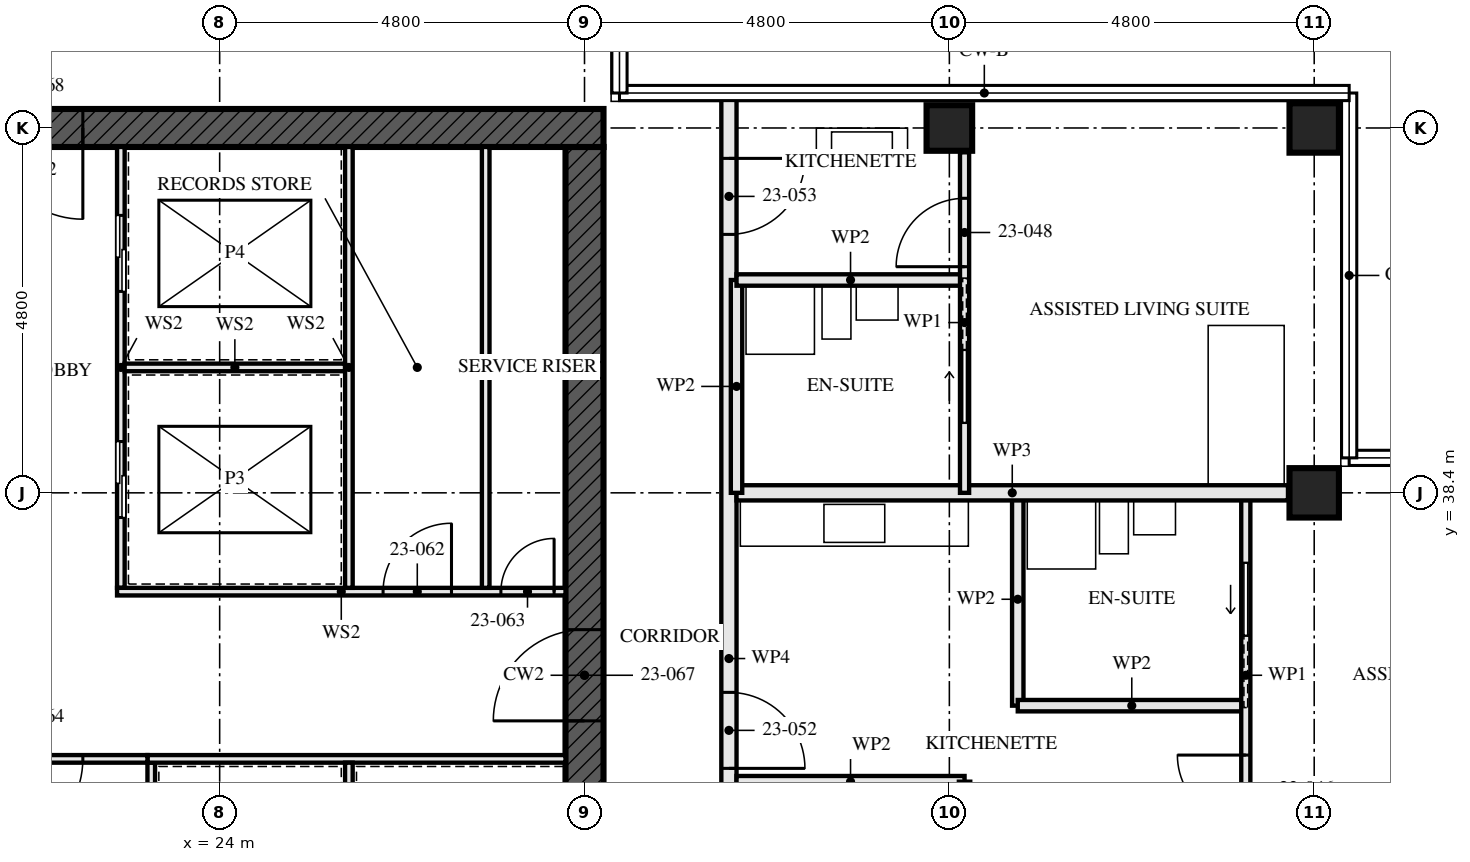
"""IFC4 building model, lengths in metres.
Left out: names, types, materials, properties, quantities, classifications, styles, units other than length and angle.
Written with IfcOpenShell. Run it as: python <this file> out.ifc"""

import sys

from ifc_helpers import new_model, si_unit, direction, frame, frame_2d, origin, origin_2d, place, context, subcontext, project, spatial, rectangle, hollow_rectangle, extrude, element, fill, save


model = new_model("IFC4")
c1 = context("Model", 3, precision=1e-05, world=origin(), true_north=direction((0.0, 1.0)))
c2 = subcontext(c1, "Body", "Model", "MODEL_VIEW")
j1 = project(units=[si_unit("LENGTHUNIT", "METRE"), si_unit("PLANEANGLEUNIT", "RADIAN")], contexts=[c1])
p1 = place(None, origin())
s1 = spatial("IfcSite", under=j1, at=p1, CompositionType="ELEMENT")
p2 = place(p1, origin())
s2 = spatial("IfcBuilding", under=s1, at=p2, CompositionType="ELEMENT")
p3 = place(p2, frame((0.0, 0.0, 87.5)))
s3 = spatial("IfcBuildingStorey", under=s2, at=p3, CompositionType="ELEMENT", Elevation=87.5)
p4 = place(p3, frame((33.6, 43.2, 0.0), z_axis=(0.0, 0.0, 1.0), x_axis=(0.0, 1.0, 0.0)))
e1 = element("IfcColumn", 1, at=p4, inside=s3, PredefinedType="COLUMN", context=c2, shape_type="SweptSolid", body=[
    extrude(hollow_rectangle(XDim=0.6, YDim=0.6, WallThickness=0.08, at=origin_2d()), origin(), (0.0, 0.0, 1.0), 3.5),
])
for number, where, z_axis, x_axis in (
    (2, (38.4, 38.4, 0.0), (0.0, 0.0, 1.0), (0.0, 1.0, 0.0)),
    (3, (38.4, 43.2, 0.0), (0.0, 0.0, 1.0), (0.0, 1.0, 0.0)),
):
    element("IfcColumn", number, at=place(p3, frame(where, z_axis=z_axis, x_axis=x_axis)), inside=s3, PredefinedType="COLUMN", context=c2, shape_type="SweptSolid", body=[
        extrude(hollow_rectangle(XDim=0.65, YDim=0.65, WallThickness=0.08, at=origin_2d()), origin(), (0.0, 0.0, 1.0), 3.5),
    ])
p5 = place(p3, frame((29.05, 43.2, -0.17), z_axis=(0.0, 0.0, 1.0), x_axis=(-1.0, 0.0, 0.0)))
e4 = element("IfcWall", 4, at=p5, inside=s3, PredefinedType="SHEAR", context=c2, shape_type="SweptSolid", body=[
    extrude(rectangle(XDim=14.9, YDim=0.5, at=frame_2d((7.45, 0.0))), origin(), (0.0, 0.0, 1.0), 3.5),
])
p6 = place(p5, frame((6.85, 0.0, 0.17)))
e5 = element("IfcOpeningElement", 5, at=p6, cuts=e4, PredefinedType="OPENING", context=c2, shape_type="SweptSolid", body=[
    extrude(rectangle(XDim=1.2, YDim=2.1, at=frame_2d((0.6, 1.05))), frame((0.0, 0.26, 0.0), z_axis=(0.0, -1.0, 0.0), x_axis=(1.0, 0.0, 0.0)), (0.0, 0.0, 1.0), 0.521),
])
p7 = place(p3, frame((28.8, 29.05, -0.17), z_axis=(0.0, 0.0, 1.0), x_axis=(0.0, 1.0, 0.0)))
e6 = element("IfcWall", 6, at=p7, inside=s3, PredefinedType="SHEAR", context=c2, shape_type="SweptSolid", body=[
    extrude(rectangle(XDim=13.9, YDim=0.5, at=frame_2d((6.95, 0.0))), origin(), (0.0, 0.0, 1.0), 3.5),
])
p8 = place(p7, frame((6.35, 0.0, 0.17)))
e7 = element("IfcOpeningElement", 7, at=p8, cuts=e6, PredefinedType="OPENING", context=c2, shape_type="SweptSolid", body=[
    extrude(rectangle(XDim=1.2, YDim=2.1, at=frame_2d((0.6, 1.05))), frame((0.0, 0.26, 0.0), z_axis=(0.0, -1.0, 0.0), x_axis=(1.0, 0.0, 0.0)), (0.0, 0.0, 1.0), 0.521),
])
p9 = place(p3, frame((33.8, 32.2, 0.0), z_axis=(0.0, 0.0, 1.0), x_axis=(0.0, 1.0, 0.0)))
e8 = element("IfcWall", 8, at=p9, inside=s3, PredefinedType="PARTITIONING", context=c2, shape_type="SweptSolid", body=[
    extrude(rectangle(XDim=2.4, YDim=0.15, at=frame_2d((1.2, 0.0))), origin(), (0.0, 0.0, 1.0), 2.55),
])
for number, where, z_axis, x_axis in (
    (9, (33.8, 34.6, 0.0), (0.0, 0.0, 1.0), (-1.0, 0.0, 0.0)),
    (10, (37.5, 35.6, 0.0), (0.0, 0.0, 1.0), (-1.0, 0.0, 0.0)),
):
    element("IfcWall", number, at=place(p3, frame(where, z_axis=z_axis, x_axis=x_axis)), inside=s3, PredefinedType="PARTITIONING", context=c2, shape_type="SweptSolid", body=[
        extrude(rectangle(XDim=3.0, YDim=0.15, at=frame_2d((1.5, 0.0))), origin(), (0.0, 0.0, 1.0), 3.33),
    ])
p10 = place(p3, frame((34.5, 35.6, 0.0), z_axis=(0.0, 0.0, 1.0), x_axis=(0.0, 1.0, 0.0)))
e11 = element("IfcWall", 11, at=p10, inside=s3, PredefinedType="PARTITIONING", context=c2, shape_type="SweptSolid", body=[
    extrude(rectangle(XDim=2.8, YDim=0.15, at=frame_2d((1.4, 0.0))), origin(), (0.0, 0.0, 1.0), 3.33),
])
p11 = place(p3, frame((37.5, 33.6, 0.0), z_axis=(0.0, 0.0, 1.0), x_axis=(0.0, 1.0, 0.0)))
e12 = element("IfcWall", 12, at=p11, inside=s3, PredefinedType="PARTITIONING", context=c2, shape_type="SweptSolid", body=[
    extrude(rectangle(XDim=4.8, YDim=0.12, at=frame_2d((2.4, 0.0))), origin(), (0.0, 0.0, 1.0), 3.33),
])
p12 = place(p11, frame((0.45, 0.0, 0.0)))
e13 = element("IfcOpeningElement", 13, at=p12, cuts=e12, PredefinedType="OPENING", context=c2, shape_type="SweptSolid", body=[
    extrude(rectangle(XDim=0.9, YDim=2.1, at=frame_2d((0.45, 1.05))), frame((0.0, 0.071, 0.0), z_axis=(0.0, -1.0, 0.0), x_axis=(1.0, 0.0, 0.0)), (0.0, 0.0, 1.0), 0.141),
])
p13 = place(p11, frame((2.925, 0.0, 0.0)))
e14 = element("IfcOpeningElement", 14, at=p13, cuts=e12, PredefinedType="OPENING", context=c2, shape_type="SweptSolid", body=[
    extrude(rectangle(XDim=0.95, YDim=2.1, at=frame_2d((0.475, 1.05))), frame((0.0, 0.071, 0.0), z_axis=(0.0, -1.0, 0.0), x_axis=(1.0, 0.0, 0.0)), (0.0, 0.0, 1.0), 0.141),
])
p14 = place(p3, frame((38.055, 38.4, 0.0), z_axis=(0.0, 0.0, 1.0), x_axis=(-1.0, 0.0, 0.0)))
e15 = element("IfcWall", 15, at=p14, inside=s3, PredefinedType="PARTITIONING", context=c2, shape_type="SweptSolid", body=[
    extrude(rectangle(XDim=7.255, YDim=0.2, at=frame_2d((3.627, 0.0))), origin(), (0.0, 0.0, 1.0), 2.55),
])
p15 = place(p3, frame((33.8, 41.2, 0.0), z_axis=(0.0, 0.0, 1.0), x_axis=(-1.0, 0.0, 0.0)))
e16 = element("IfcWall", 16, at=p15, inside=s3, PredefinedType="PARTITIONING", context=c2, shape_type="SweptSolid", body=[
    extrude(rectangle(XDim=3.0, YDim=0.15, at=frame_2d((1.5, 0.0))), origin(), (0.0, 0.0, 1.0), 3.33),
])
p16 = place(p3, frame((30.8, 38.4, 0.0), z_axis=(0.0, 0.0, 1.0), x_axis=(0.0, 1.0, 0.0)))
e17 = element("IfcWall", 17, at=p16, inside=s3, PredefinedType="PARTITIONING", context=c2, shape_type="SweptSolid", body=[
    extrude(rectangle(XDim=2.8, YDim=0.15, at=frame_2d((1.4, 0.0))), origin(), (0.0, 0.0, 1.0), 3.33),
])
p17 = place(p3, frame((33.8, 38.4, 0.0), z_axis=(0.0, 0.0, 1.0), x_axis=(0.0, 1.0, 0.0)))
e18 = element("IfcWall", 18, at=p17, inside=s3, PredefinedType="PARTITIONING", context=c2, shape_type="SweptSolid", body=[
    extrude(rectangle(XDim=4.48, YDim=0.12, at=frame_2d((2.24, 0.0))), origin(), (0.0, 0.0, 1.0), 3.33),
])
p18 = place(p17, frame((2.975, 0.0, 0.0)))
e19 = element("IfcOpeningElement", 19, at=p18, cuts=e18, PredefinedType="OPENING", context=c2, shape_type="SweptSolid", body=[
    extrude(rectangle(XDim=0.9, YDim=2.1, at=frame_2d((0.45, 1.05))), frame((0.0, 0.071, 0.0), z_axis=(0.0, -1.0, 0.0), x_axis=(1.0, 0.0, 0.0)), (0.0, 0.0, 1.0), 0.141),
])
p19 = place(p17, frame((0.925, 0.0, 0.0)))
e20 = element("IfcOpeningElement", 20, at=p19, cuts=e18, PredefinedType="OPENING", context=c2, shape_type="SweptSolid", body=[
    extrude(rectangle(XDim=0.95, YDim=2.1, at=frame_2d((0.475, 1.05))), frame((0.0, 0.071, 0.0), z_axis=(0.0, -1.0, 0.0), x_axis=(1.0, 0.0, 0.0)), (0.0, 0.0, 1.0), 0.141),
])
p20 = place(p3, frame((30.7, 28.8, 0.0), z_axis=(0.0, 0.0, 1.0), x_axis=(0.0, 1.0, 0.0)))
e21 = element("IfcWall", 21, at=p20, inside=s3, PredefinedType="PARTITIONING", context=c2, shape_type="SweptSolid", body=[
    extrude(rectangle(XDim=14.84, YDim=0.2, at=frame_2d((7.42, 0.0))), origin(), (0.0, 0.0, 1.0), 2.32),
])
p21 = place(p20, frame((1.4, 0.0, 0.0)))
e22 = element("IfcOpeningElement", 22, at=p21, cuts=e21, PredefinedType="OPENING", context=c2, shape_type="SweptSolid", body=[
    extrude(rectangle(XDim=1.0, YDim=2.1, at=frame_2d((0.5, 1.05))), frame((0.0, 0.111, 0.0), z_axis=(0.0, -1.0, 0.0), x_axis=(1.0, 0.0, 0.0)), (0.0, 0.0, 1.0), 0.221),
])
p22 = place(p20, frame((4.1, 0.0, 0.0)))
e23 = element("IfcOpeningElement", 23, at=p22, cuts=e21, PredefinedType="OPENING", context=c2, shape_type="SweptSolid", body=[
    extrude(rectangle(XDim=1.0, YDim=2.1, at=frame_2d((0.5, 1.05))), frame((0.0, 0.111, 0.0), z_axis=(0.0, -1.0, 0.0), x_axis=(1.0, 0.0, 0.0)), (0.0, 0.0, 1.0), 0.221),
])
p23 = place(p20, frame((5.975, 0.0, 0.0)))
e24 = element("IfcOpeningElement", 24, at=p23, cuts=e21, PredefinedType="OPENING", context=c2, shape_type="SweptSolid", body=[
    extrude(rectangle(XDim=1.0, YDim=2.1, at=frame_2d((0.5, 1.05))), frame((0.0, 0.111, 0.0), z_axis=(0.0, -1.0, 0.0), x_axis=(1.0, 0.0, 0.0)), (0.0, 0.0, 1.0), 0.221),
])
p24 = place(p20, frame((13.0, 0.0, 0.0)))
e25 = element("IfcOpeningElement", 25, at=p24, cuts=e21, PredefinedType="OPENING", context=c2, shape_type="SweptSolid", body=[
    extrude(rectangle(XDim=1.0, YDim=2.1, at=frame_2d((0.5, 1.05))), frame((0.0, 0.111, 0.0), z_axis=(0.0, -1.0, 0.0), x_axis=(1.0, 0.0, 0.0)), (0.0, 0.0, 1.0), 0.221),
])
p25 = place(p3, frame((27.5, 37.15, 0.0), z_axis=(0.0, 0.0, 1.0), x_axis=(0.0, 1.0, 0.0)))
e26 = element("IfcWall", 26, at=p25, inside=s3, PredefinedType="SOLIDWALL", context=c2, shape_type="SweptSolid", body=[
    extrude(rectangle(XDim=5.8, YDim=0.1, at=frame_2d((2.9, 0.0))), origin(), (0.0, 0.0, 1.0), 3.33),
])
p26 = place(p3, frame((22.7, 37.15, 0.0), z_axis=(0.0, 0.0, 1.0), x_axis=(0.0, 1.0, 0.0)))
e27 = element("IfcWall", 27, at=p26, inside=s3, PredefinedType="SOLIDWALL", context=c2, shape_type="SweptSolid", body=[
    extrude(rectangle(XDim=5.8, YDim=0.1, at=frame_2d((2.9, 0.0))), origin(), (0.0, 0.0, 1.0), 3.33),
])
p27 = place(p26, frame((0.925, 0.0, 0.0)))
e28 = element("IfcOpeningElement", 28, at=p27, cuts=e27, PredefinedType="OPENING", context=c2, shape_type="SweptSolid", body=[
    extrude(rectangle(XDim=1.0, YDim=2.1, at=frame_2d((0.5, 1.05))), frame((0.0, 0.061, 0.0), z_axis=(0.0, -1.0, 0.0), x_axis=(1.0, 0.0, 0.0)), (0.0, 0.0, 1.0), 0.121),
])
p28 = place(p26, frame((3.9, 0.0, 0.0)))
e29 = element("IfcOpeningElement", 29, at=p28, cuts=e27, PredefinedType="OPENING", context=c2, shape_type="SweptSolid", body=[
    extrude(rectangle(XDim=1.0, YDim=2.1, at=frame_2d((0.5, 1.05))), frame((0.0, 0.061, 0.0), z_axis=(0.0, -1.0, 0.0), x_axis=(1.0, 0.0, 0.0)), (0.0, 0.0, 1.0), 0.121),
])
p29 = place(p3, frame((23.1, 29.05, 0.0), z_axis=(0.0, 0.0, 1.0), x_axis=(0.0, 1.0, 0.0)))
e30 = element("IfcWall", 30, at=p29, inside=s3, PredefinedType="SOLIDWALL", context=c2, shape_type="SweptSolid", body=[
    extrude(rectangle(XDim=5.8, YDim=0.1, at=frame_2d((2.9, 0.0))), origin(), (0.0, 0.0, 1.0), 3.33),
])
p30 = place(p29, frame((1.0, 0.0, 0.0)))
e31 = element("IfcOpeningElement", 31, at=p30, cuts=e30, PredefinedType="OPENING", context=c2, shape_type="SweptSolid", body=[
    extrude(rectangle(XDim=0.7, YDim=2.1, at=frame_2d((0.35, 1.05))), frame((0.0, 0.061, 0.0), z_axis=(0.0, -1.0, 0.0), x_axis=(1.0, 0.0, 0.0)), (0.0, 0.0, 1.0), 0.121),
])
p31 = place(p3, frame((23.05, 34.9, 0.0), z_axis=(0.0, 0.0, 1.0), x_axis=(1.0, 0.0, 0.0)))
e32 = element("IfcWall", 32, at=p31, inside=s3, PredefinedType="SOLIDWALL", context=c2, shape_type="SweptSolid", body=[
    extrude(rectangle(XDim=5.5, YDim=0.1, at=frame_2d((2.75, 0.0))), origin(), (0.0, 0.0, 1.0), 3.33),
])
p32 = place(p3, frame((22.65, 37.1, 0.0), z_axis=(0.0, 0.0, 1.0), x_axis=(1.0, 0.0, 0.0)))
e33 = element("IfcWall", 33, at=p32, inside=s3, PredefinedType="SOLIDWALL", context=c2, shape_type="SweptSolid", body=[
    extrude(rectangle(XDim=5.9, YDim=0.1, at=frame_2d((2.95, 0.0))), origin(), (0.0, 0.0, 1.0), 3.33),
])
p33 = place(p32, frame((3.5, 0.0, 0.0)))
e34 = element("IfcOpeningElement", 34, at=p33, cuts=e33, PredefinedType="OPENING", context=c2, shape_type="SweptSolid", body=[
    extrude(rectangle(XDim=0.9, YDim=2.1, at=frame_2d((0.45, 1.05))), frame((0.0, 0.061, 0.0), z_axis=(0.0, -1.0, 0.0), x_axis=(1.0, 0.0, 0.0)), (0.0, 0.0, 1.0), 0.121),
])
p34 = place(p32, frame((5.05, 0.0, 0.0)))
e35 = element("IfcOpeningElement", 35, at=p34, cuts=e33, PredefinedType="OPENING", context=c2, shape_type="SweptSolid", body=[
    extrude(rectangle(XDim=0.7, YDim=2.1, at=frame_2d((0.35, 1.05))), frame((0.0, 0.061, 0.0), z_axis=(0.0, -1.0, 0.0), x_axis=(1.0, 0.0, 0.0)), (0.0, 0.0, 1.0), 0.121),
])
p35 = place(p3, frame((20.55, 34.9, 0.0), z_axis=(0.0, 0.0, 1.0), x_axis=(1.0, 0.0, 0.0)))
e36 = element("IfcWall", 36, at=p35, inside=s3, PredefinedType="SOLIDWALL", context=c2, shape_type="SweptSolid", body=[
    extrude(rectangle(XDim=2.5, YDim=0.1, at=frame_2d((1.25, 0.0))), origin(), (0.0, 0.0, 1.0), 3.33),
])
p36 = place(p35, frame((0.45, 0.0, 0.0)))
e37 = element("IfcOpeningElement", 37, at=p36, cuts=e36, PredefinedType="OPENING", context=c2, shape_type="SweptSolid", body=[
    extrude(rectangle(XDim=1.2, YDim=2.1, at=frame_2d((0.6, 1.05))), frame((0.0, 0.061, 0.0), z_axis=(0.0, -1.0, 0.0), x_axis=(1.0, 0.0, 0.0)), (0.0, 0.0, 1.0), 0.121),
])
p37 = place(p3, frame((22.75, 40.05, 0.0), z_axis=(0.0, 0.0, 1.0), x_axis=(1.0, 0.0, 0.0)))
e38 = element("IfcWall", 38, at=p37, inside=s3, PredefinedType="SOLIDWALL", context=c2, shape_type="SweptSolid", body=[
    extrude(rectangle(XDim=2.9, YDim=0.1, at=frame_2d((1.45, 0.0))), origin(), (0.0, 0.0, 1.0), 3.33),
])
p38 = place(p3, frame((25.7, 37.15, 0.0), z_axis=(0.0, 0.0, 1.0), x_axis=(0.0, 1.0, 0.0)))
e39 = element("IfcWall", 39, at=p38, inside=s3, PredefinedType="SOLIDWALL", context=c2, shape_type="SweptSolid", body=[
    extrude(rectangle(XDim=5.8, YDim=0.1, at=frame_2d((2.9, 0.0))), origin(), (0.0, 0.0, 1.0), 3.33),
])
p39 = place(p3, frame((25.7, 31.95, 0.0), z_axis=(0.0, 0.0, 1.0), x_axis=(0.0, 1.0, 0.0)))
e40 = element("IfcWall", 40, at=p39, inside=s3, PredefinedType="SOLIDWALL", context=c2, shape_type="SweptSolid", body=[
    extrude(rectangle(XDim=2.9, YDim=0.1, at=frame_2d((1.45, 0.0))), origin(), (0.0, 0.0, 1.0), 3.33),
])
p40 = place(p12, origin())
e41 = element("IfcDoor", 41, at=p40, inside=s3, OperationType="SINGLE_SWING_LEFT", PredefinedType="DOOR", context=c2, shape_type="SweptSolid", body=[
    extrude(rectangle(XDim=0.9, YDim=2.1, at=frame_2d((0.45, 1.05))), frame((0.0, 0.022, 0.0), z_axis=(0.0, -1.0, 0.0), x_axis=(1.0, 0.0, 0.0)), (0.0, 0.0, 1.0), 0.044),
])
fill(e13, e41)
p41 = place(p13, origin())
e42 = element("IfcDoor", 42, at=p41, inside=s3, OperationType="SLIDING_TO_RIGHT", PredefinedType="DOOR", context=c2, shape_type="SweptSolid", body=[
    extrude(rectangle(XDim=0.95, YDim=2.1, at=frame_2d((0.475, 1.05))), frame((0.0, 0.022, 0.0), z_axis=(0.0, -1.0, 0.0), x_axis=(1.0, 0.0, 0.0)), (0.0, 0.0, 1.0), 0.044),
])
fill(e14, e42)
p42 = place(p18, origin())
e43 = element("IfcDoor", 43, at=p42, inside=s3, OperationType="SINGLE_SWING_RIGHT", PredefinedType="DOOR", context=c2, shape_type="SweptSolid", body=[
    extrude(rectangle(XDim=0.9, YDim=2.1, at=frame_2d((0.45, 1.05))), frame((0.0, 0.022, 0.0), z_axis=(0.0, -1.0, 0.0), x_axis=(1.0, 0.0, 0.0)), (0.0, 0.0, 1.0), 0.044),
])
fill(e19, e43)
p43 = place(p19, origin())
e44 = element("IfcDoor", 44, at=p43, inside=s3, OperationType="SLIDING_TO_LEFT", PredefinedType="DOOR", context=c2, shape_type="SweptSolid", body=[
    extrude(rectangle(XDim=0.95, YDim=2.1, at=frame_2d((0.475, 1.05))), frame((0.0, 0.022, 0.0), z_axis=(0.0, -1.0, 0.0), x_axis=(1.0, 0.0, 0.0)), (0.0, 0.0, 1.0), 0.044),
])
fill(e20, e44)
p44 = place(p23, frame((1.0, 0.0, 0.0), z_axis=(0.0, 0.0, 1.0), x_axis=(-1.0, 0.0, 0.0)))
e45 = element("IfcDoor", 45, at=p44, inside=s3, OperationType="SINGLE_SWING_LEFT", PredefinedType="DOOR", context=c2, shape_type="SweptSolid", body=[
    extrude(rectangle(XDim=1.0, YDim=2.1, at=frame_2d((0.5, 1.05))), frame((0.0, 0.027, 0.0), z_axis=(0.0, -1.0, 0.0), x_axis=(1.0, 0.0, 0.0)), (0.0, 0.0, 1.0), 0.054),
])
fill(e24, e45)
p45 = place(p24, frame((1.0, 0.0, 0.0), z_axis=(0.0, 0.0, 1.0), x_axis=(-1.0, 0.0, 0.0)))
e46 = element("IfcDoor", 46, at=p45, inside=s3, OperationType="SINGLE_SWING_RIGHT", PredefinedType="DOOR", context=c2, shape_type="SweptSolid", body=[
    extrude(rectangle(XDim=1.0, YDim=2.1, at=frame_2d((0.5, 1.05))), frame((0.0, 0.027, 0.0), z_axis=(0.0, -1.0, 0.0), x_axis=(1.0, 0.0, 0.0)), (0.0, 0.0, 1.0), 0.054),
])
fill(e25, e46)
p46 = place(p27, origin())
e47 = element("IfcDoor", 47, at=p46, inside=s3, OperationType="SLIDING_TO_LEFT", PredefinedType="DOOR", context=c2, shape_type="SweptSolid", body=[
    extrude(rectangle(XDim=1.0, YDim=2.1, at=frame_2d((0.5, 1.05))), frame((0.0, 0.05, 0.0), z_axis=(0.0, -1.0, 0.0), x_axis=(1.0, 0.0, 0.0)), (0.0, 0.0, 1.0), 0.1),
])
fill(e28, e47)
p47 = place(p28, origin())
e48 = element("IfcDoor", 48, at=p47, inside=s3, OperationType="SLIDING_TO_LEFT", PredefinedType="DOOR", context=c2, shape_type="SweptSolid", body=[
    extrude(rectangle(XDim=1.0, YDim=2.1, at=frame_2d((0.5, 1.05))), frame((0.0, 0.05, 0.0), z_axis=(0.0, -1.0, 0.0), x_axis=(1.0, 0.0, 0.0)), (0.0, 0.0, 1.0), 0.1),
])
fill(e29, e48)
p48 = place(p33, origin())
e49 = element("IfcDoor", 49, at=p48, inside=s3, OperationType="SINGLE_SWING_LEFT", PredefinedType="DOOR", context=c2, shape_type="SweptSolid", body=[
    extrude(rectangle(XDim=0.9, YDim=2.1, at=frame_2d((0.45, 1.05))), frame((0.0, 0.027, 0.0), z_axis=(0.0, -1.0, 0.0), x_axis=(1.0, 0.0, 0.0)), (0.0, 0.0, 1.0), 0.054),
])
fill(e34, e49)
p49 = place(p34, origin())
e50 = element("IfcDoor", 50, at=p49, inside=s3, OperationType="SINGLE_SWING_LEFT", PredefinedType="DOOR", context=c2, shape_type="SweptSolid", body=[
    extrude(rectangle(XDim=0.7, YDim=2.1, at=frame_2d((0.35, 1.05))), frame((0.0, 0.027, 0.0), z_axis=(0.0, -1.0, 0.0), x_axis=(1.0, 0.0, 0.0)), (0.0, 0.0, 1.0), 0.054),
])
fill(e35, e50)
p50 = place(p36, frame((1.2, 0.0, 0.0), z_axis=(0.0, 0.0, 1.0), x_axis=(-1.0, 0.0, 0.0)))
e51 = element("IfcDoor", 51, at=p50, inside=s3, OperationType="SINGLE_SWING_LEFT", PredefinedType="DOOR", context=c2, shape_type="SweptSolid", body=[
    extrude(rectangle(XDim=1.2, YDim=2.1, at=frame_2d((0.6, 1.05))), frame((0.0, 0.027, 0.0), z_axis=(0.0, -1.0, 0.0), x_axis=(1.0, 0.0, 0.0)), (0.0, 0.0, 1.0), 0.054),
])
fill(e37, e51)
p51 = place(p8, origin())
e52 = element("IfcDoor", 52, at=p51, inside=s3, OperationType="SINGLE_SWING_LEFT", PredefinedType="DOOR", context=c2, shape_type="SweptSolid", body=[
    extrude(rectangle(XDim=1.2, YDim=2.1, at=frame_2d((0.6, 1.05))), frame((0.0, 0.027, 0.0), z_axis=(0.0, -1.0, 0.0), x_axis=(1.0, 0.0, 0.0)), (0.0, 0.0, 1.0), 0.054),
])
fill(e7, e52)
p52 = place(p6, origin())
e53 = element("IfcDoor", 53, at=p52, inside=s3, OperationType="SINGLE_SWING_LEFT", PredefinedType="DOOR", context=c2, shape_type="SweptSolid", body=[
    extrude(rectangle(XDim=1.2, YDim=2.1, at=frame_2d((0.6, 1.05))), frame((0.0, 0.027, 0.0), z_axis=(0.0, -1.0, 0.0), x_axis=(1.0, 0.0, 0.0)), (0.0, 0.0, 1.0), 0.054),
])
fill(e5, e53)
save(model, sys.argv[1])
